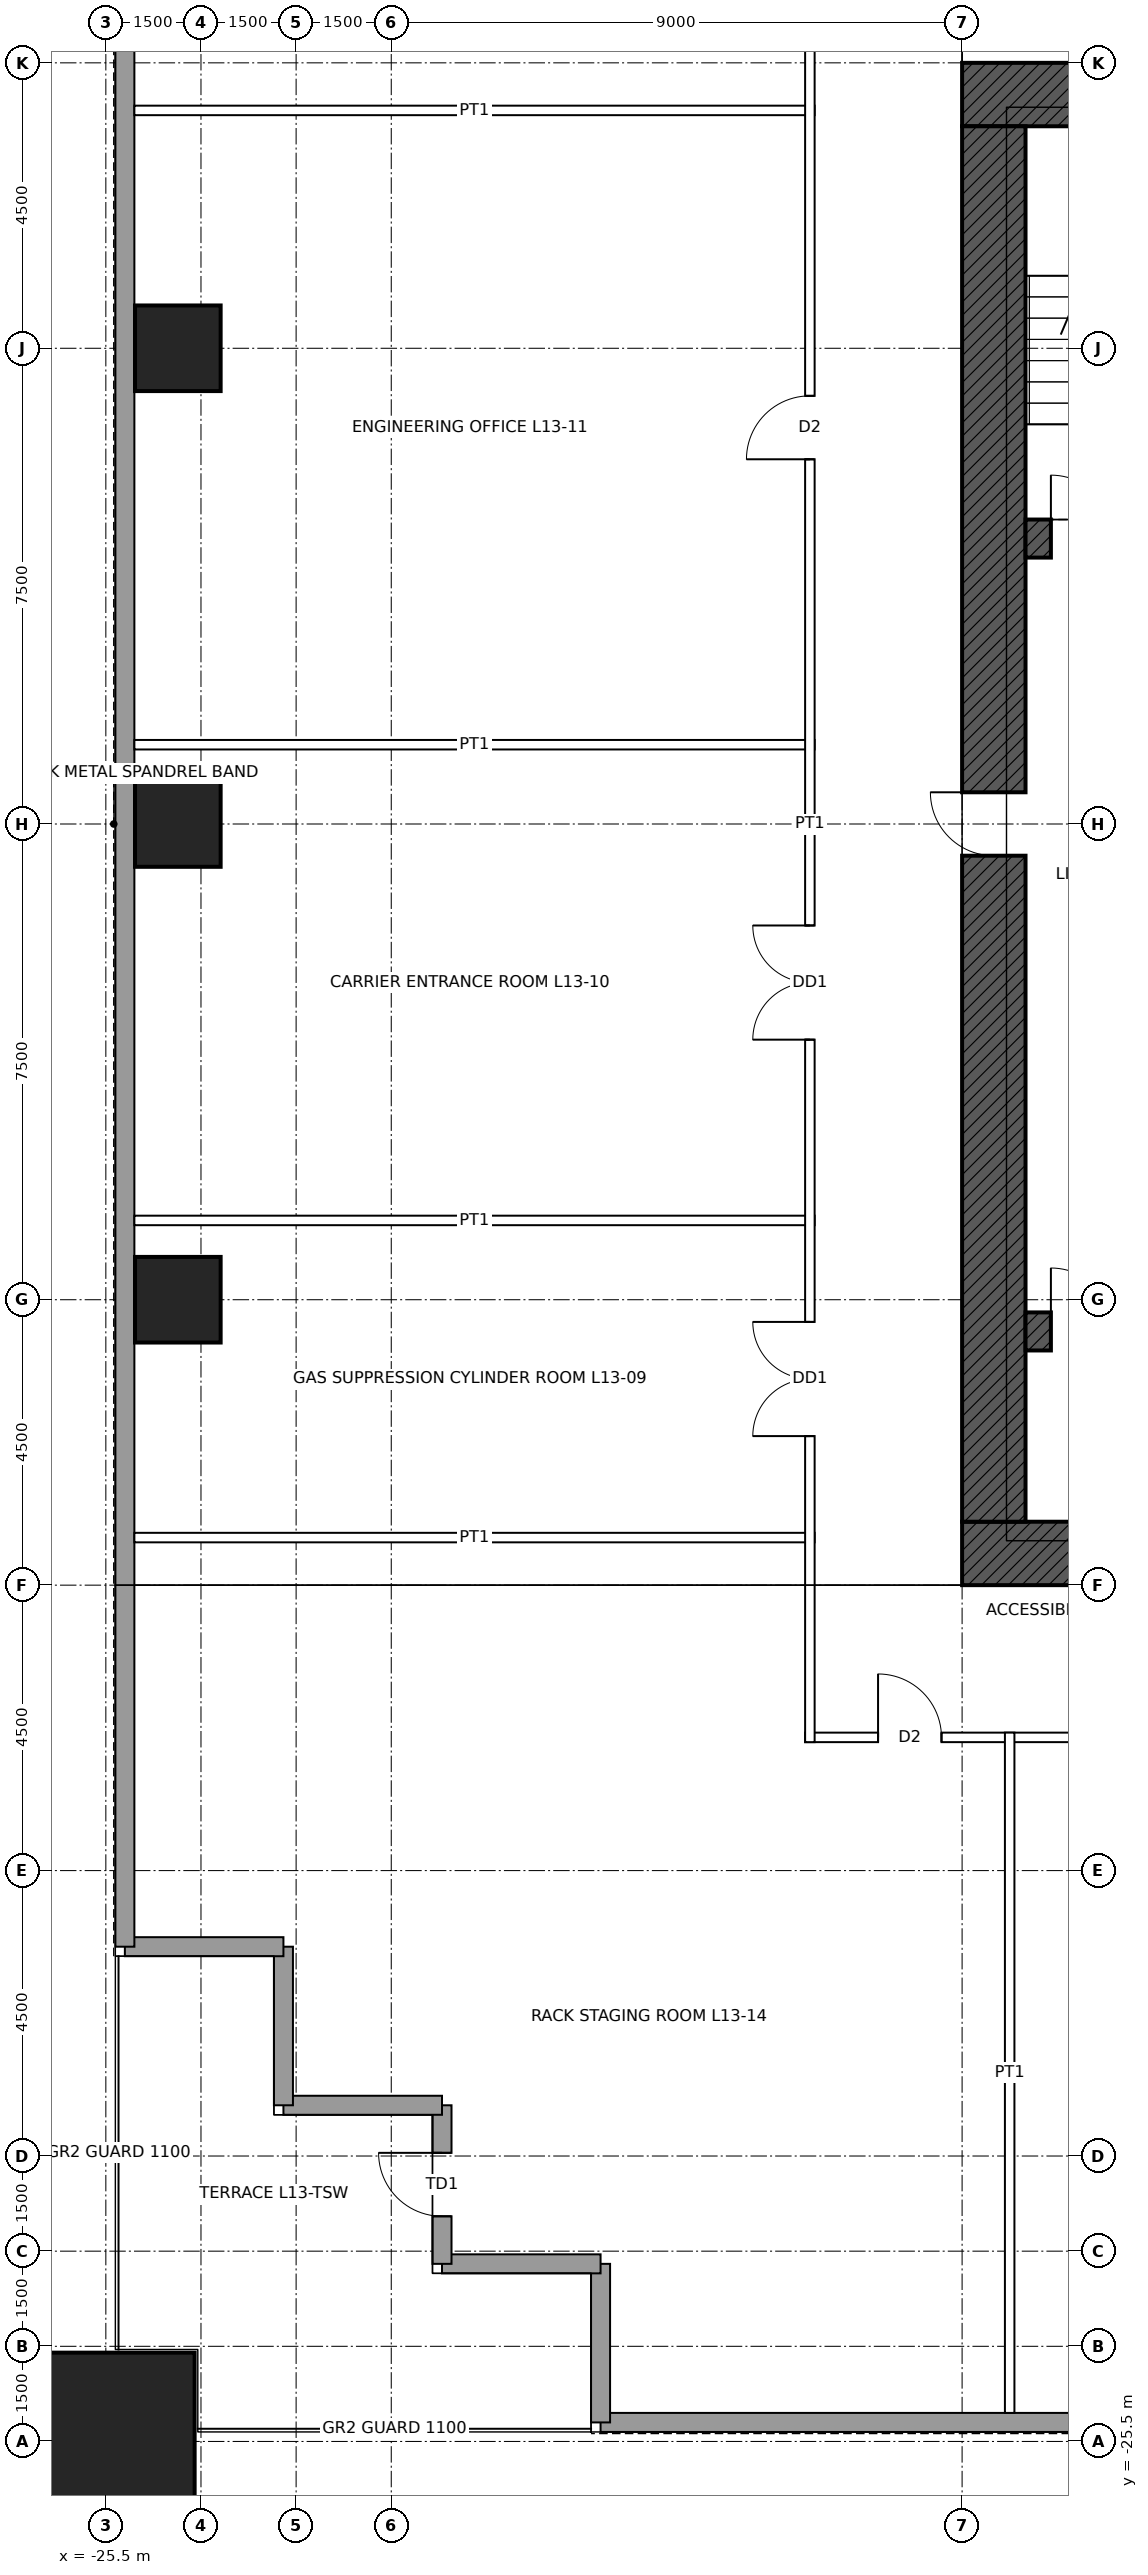
"""IFC4 building model, lengths in metres.
Left out: names, types, materials, properties, quantities, classifications, styles, units other than length and angle.
Written with IfcOpenShell. Run it as: python <this file> out.ifc"""

import sys

from ifc_helpers import new_model, si_unit, direction, frame, frame_2d, origin, origin_2d, place, context, subcontext, project, spatial, rectangle, hollow_rectangle, extrude, element, fill, save


model = new_model("IFC4")
c1 = context("Model", 3, precision=1e-05, world=origin(), true_north=direction((0.0, 1.0)))
c2 = subcontext(c1, "Body", "Model", "MODEL_VIEW")
j1 = project(units=[si_unit("LENGTHUNIT", "METRE"), si_unit("PLANEANGLEUNIT", "RADIAN")], contexts=[c1])
p1 = place(None, origin())
s1 = spatial("IfcSite", under=j1, at=p1, CompositionType="ELEMENT")
p2 = place(p1, origin())
s2 = spatial("IfcBuilding", under=s1, at=p2, CompositionType="ELEMENT")
p3 = place(p2, frame((0.0, 0.0, 68.4)))
s3 = spatial("IfcBuildingStorey", under=s2, at=p3, CompositionType="ELEMENT", Elevation=68.4)
p4 = place(p3, frame((-25.5, -25.5, 0.0), z_axis=(0.0, 0.0, 1.0), x_axis=(1.0, 0.0, 0.0)))
e1 = element("IfcColumn", 1, at=p4, inside=s3, PredefinedType="COLUMN", context=c2, shape_type="SweptSolid", body=[
    extrude(hollow_rectangle(XDim=2.8, YDim=2.8, WallThickness=0.14, at=origin_2d()), origin(), (0.0, 0.0, 1.0), 5.0),
])
for number, where, z_axis, x_axis in (
    (2, (-24.365, -7.5, 0.0), (0.0, 0.0, 1.0), (1.0, 0.0, 0.0)),
    (3, (-24.365, 0.0, 0.0), (0.0, 0.0, 1.0), (1.0, 0.0, 0.0)),
    (4, (-24.365, 7.5, 0.0), (0.0, 0.0, 1.0), (1.0, 0.0, 0.0)),
):
    element("IfcColumn", number, at=place(p3, frame(where, z_axis=z_axis, x_axis=x_axis)), inside=s3, PredefinedType="COLUMN", context=c2, shape_type="SweptSolid", body=[
        extrude(hollow_rectangle(XDim=1.35, YDim=1.35, WallThickness=0.085, at=origin_2d()), origin(), (0.0, 0.0, 1.0), 5.0),
    ])
p5 = place(p3, frame((-12.0, 11.5, 0.0), z_axis=(0.0, 0.0, 1.0), x_axis=(1.0, 0.0, 0.0)))
e5 = element("IfcWall", 5, at=p5, inside=s3, PredefinedType="SHEAR", context=c2, shape_type="SweptSolid", body=[
    extrude(rectangle(XDim=24.0, YDim=1.0, at=frame_2d((12.0, 0.0))), origin(), (0.0, 0.0, 1.0), 5.0),
])
p6 = place(p5, frame((6.25, 0.0, 0.0)))
e6 = element("IfcOpeningElement", 6, at=p6, cuts=e5, PredefinedType="OPENING", context=c2, shape_type="SweptSolid", body=[
    extrude(rectangle(XDim=1.0, YDim=2.4, at=frame_2d((0.5, 1.2))), frame((0.0, 0.51, 0.0), z_axis=(0.0, -1.0, 0.0), x_axis=(1.0, 0.0, 0.0)), (0.0, 0.0, 1.0), 1.02),
])
p7 = place(p5, frame((16.75, 0.0, 0.0)))
e7 = element("IfcOpeningElement", 7, at=p7, cuts=e5, PredefinedType="OPENING", context=c2, shape_type="SweptSolid", body=[
    extrude(rectangle(XDim=1.0, YDim=2.4, at=frame_2d((0.5, 1.2))), frame((0.0, 0.51, 0.0), z_axis=(0.0, -1.0, 0.0), x_axis=(1.0, 0.0, 0.0)), (0.0, 0.0, 1.0), 1.02),
])
p8 = place(p3, frame((12.0, -11.5, 0.0), z_axis=(0.0, 0.0, 1.0), x_axis=(-1.0, 0.0, 0.0)))
e8 = element("IfcWall", 8, at=p8, inside=s3, PredefinedType="SHEAR", context=c2, shape_type="SweptSolid", body=[
    extrude(rectangle(XDim=24.0, YDim=1.0, at=frame_2d((12.0, 0.0))), origin(), (0.0, 0.0, 1.0), 5.0),
])
p9 = place(p8, frame((11.5, 0.0, 0.0)))
e9 = element("IfcOpeningElement", 9, at=p9, cuts=e8, PredefinedType="OPENING", context=c2, shape_type="SweptSolid", body=[
    extrude(rectangle(XDim=1.0, YDim=2.1, at=frame_2d((0.5, 1.05))), frame((0.0, 0.51, 0.0), z_axis=(0.0, -1.0, 0.0), x_axis=(1.0, 0.0, 0.0)), (0.0, 0.0, 1.0), 1.02),
])
p10 = place(p8, frame((1.0, 0.0, 0.0)))
e10 = element("IfcOpeningElement", 10, at=p10, cuts=e8, PredefinedType="OPENING", context=c2, shape_type="SweptSolid", body=[
    extrude(rectangle(XDim=1.0, YDim=2.4, at=frame_2d((0.5, 1.2))), frame((0.0, 0.51, 0.0), z_axis=(0.0, -1.0, 0.0), x_axis=(1.0, 0.0, 0.0)), (0.0, 0.0, 1.0), 1.02),
])
p11 = place(p3, frame((-11.5, -11.0, 0.0), z_axis=(0.0, 0.0, 1.0), x_axis=(0.0, 1.0, 0.0)))
e11 = element("IfcWall", 11, at=p11, inside=s3, PredefinedType="SHEAR", context=c2, shape_type="SweptSolid", body=[
    extrude(rectangle(XDim=22.0, YDim=1.0, at=frame_2d((11.0, 0.0))), origin(), (0.0, 0.0, 1.0), 5.0),
])
p12 = place(p11, frame((10.5, 0.0, 0.0)))
e12 = element("IfcOpeningElement", 12, at=p12, cuts=e11, PredefinedType="OPENING", context=c2, shape_type="SweptSolid", body=[
    extrude(rectangle(XDim=1.0, YDim=2.4, at=frame_2d((0.5, 1.2))), frame((0.0, 0.51, 0.0), z_axis=(0.0, -1.0, 0.0), x_axis=(1.0, 0.0, 0.0)), (0.0, 0.0, 1.0), 1.02),
])
p13 = place(p3, frame((-11.0, 4.5, 0.0), z_axis=(0.0, 0.0, 1.0), x_axis=(1.0, 0.0, 0.0)))
e13 = element("IfcWall", 13, at=p13, inside=s3, PredefinedType="SHEAR", context=c2, shape_type="SweptSolid", body=[
    extrude(rectangle(XDim=22.0, YDim=0.6, at=frame_2d((11.0, 0.0))), origin(), (0.0, 0.0, 1.0), 5.0),
])
p14 = place(p13, frame((0.4, 0.0, 0.0)))
e14 = element("IfcOpeningElement", 14, at=p14, cuts=e13, PredefinedType="OPENING", context=c2, shape_type="SweptSolid", body=[
    extrude(rectangle(XDim=1.0, YDim=2.1, at=frame_2d((0.5, 1.05))), frame((0.0, 0.31, 0.0), z_axis=(0.0, -1.0, 0.0), x_axis=(1.0, 0.0, 0.0)), (0.0, 0.0, 1.0), 0.62),
])
p15 = place(p13, frame((20.6, 0.0, 0.0)))
e15 = element("IfcOpeningElement", 15, at=p15, cuts=e13, PredefinedType="OPENING", context=c2, shape_type="SweptSolid", body=[
    extrude(rectangle(XDim=1.0, YDim=2.1, at=frame_2d((0.5, 1.05))), frame((0.0, 0.31, 0.0), z_axis=(0.0, -1.0, 0.0), x_axis=(1.0, 0.0, 0.0)), (0.0, 0.0, 1.0), 0.62),
])
p16 = place(p3, frame((-11.0, -8.0, 0.0), z_axis=(0.0, 0.0, 1.0), x_axis=(1.0, 0.0, 0.0)))
e16 = element("IfcWall", 16, at=p16, inside=s3, PredefinedType="SHEAR", context=c2, shape_type="SweptSolid", body=[
    extrude(rectangle(XDim=2.0, YDim=0.6, at=frame_2d((1.0, 0.0))), origin(), (0.0, 0.0, 1.0), 5.0),
])
p17 = place(p16, frame((0.4, 0.0, 0.0)))
e17 = element("IfcOpeningElement", 17, at=p17, cuts=e16, PredefinedType="OPENING", context=c2, shape_type="SweptSolid", body=[
    extrude(rectangle(XDim=1.0, YDim=2.1, at=frame_2d((0.5, 1.05))), frame((0.0, 0.31, 0.0), z_axis=(0.0, -1.0, 0.0), x_axis=(1.0, 0.0, 0.0)), (0.0, 0.0, 1.0), 0.62),
])
p18 = place(p3, frame((17.7, -25.2, 0.0), z_axis=(0.0, 0.0, 1.0), x_axis=(-1.0, 0.0, 0.0)))
e18 = element("IfcWall", 18, at=p18, inside=s3, PredefinedType="SOLIDWALL", context=c2, shape_type="SweptSolid", body=[
    extrude(rectangle(XDim=35.4, YDim=0.3, at=frame_2d((17.7, 0.0))), origin(), (0.0, 0.0, 1.0), 4.8),
])
for number, where, z_axis, x_axis in (
    (19, (-17.7, -25.2, 0.0), (0.0, 0.0, 1.0), (0.0, 1.0, 0.0)),
    (20, (-17.7, -22.7, 0.0), (0.0, 0.0, 1.0), (-1.0, 0.0, 0.0)),
):
    element("IfcWall", number, at=place(p3, frame(where, z_axis=z_axis, x_axis=x_axis)), inside=s3, PredefinedType="SOLIDWALL", context=c2, shape_type="SweptSolid", body=[
        extrude(rectangle(XDim=2.5, YDim=0.3, at=frame_2d((1.25, 0.0))), origin(), (0.0, 0.0, 1.0), 4.8),
    ])
p19 = place(p3, frame((-20.2, -22.7, 0.0), z_axis=(0.0, 0.0, 1.0), x_axis=(0.0, 1.0, 0.0)))
e21 = element("IfcWall", 21, at=p19, inside=s3, PredefinedType="SOLIDWALL", context=c2, shape_type="SweptSolid", body=[
    extrude(rectangle(XDim=2.5, YDim=0.3, at=frame_2d((1.25, 0.0))), origin(), (0.0, 0.0, 1.0), 4.8),
])
p20 = place(p19, frame((0.75, 0.0, 0.0)))
e22 = element("IfcOpeningElement", 22, at=p20, cuts=e21, PredefinedType="OPENING", context=c2, shape_type="SweptSolid", body=[
    extrude(rectangle(XDim=1.0, YDim=2.4, at=frame_2d((0.5, 1.2))), frame((0.0, 0.16, 0.0), z_axis=(0.0, -1.0, 0.0), x_axis=(1.0, 0.0, 0.0)), (0.0, 0.0, 1.0), 0.32),
])
for number, where, z_axis, x_axis in (
    (23, (-20.2, -20.2, 0.0), (0.0, 0.0, 1.0), (-1.0, 0.0, 0.0)),
    (24, (-22.7, -20.2, 0.0), (0.0, 0.0, 1.0), (0.0, 1.0, 0.0)),
    (25, (-22.7, -17.7, 0.0), (0.0, 0.0, 1.0), (-1.0, 0.0, 0.0)),
):
    element("IfcWall", number, at=place(p3, frame(where, z_axis=z_axis, x_axis=x_axis)), inside=s3, PredefinedType="SOLIDWALL", context=c2, shape_type="SweptSolid", body=[
        extrude(rectangle(XDim=2.5, YDim=0.3, at=frame_2d((1.25, 0.0))), origin(), (0.0, 0.0, 1.0), 4.8),
    ])
p21 = place(p3, frame((-25.2, -17.7, 0.0), z_axis=(0.0, 0.0, 1.0), x_axis=(0.0, 1.0, 0.0)))
e26 = element("IfcWall", 26, at=p21, inside=s3, PredefinedType="SOLIDWALL", context=c2, shape_type="SweptSolid", body=[
    extrude(rectangle(XDim=35.4, YDim=0.3, at=frame_2d((17.7, 0.0))), origin(), (0.0, 0.0, 1.0), 4.8),
])
p22 = place(p3, frame((-14.475, -14.4, 0.0), z_axis=(0.0, 0.0, 1.0), x_axis=(1.0, 0.0, 0.0)))
e27 = element("IfcWall", 27, at=p22, inside=s3, PredefinedType="PARTITIONING", context=c2, shape_type="SweptSolid", body=[
    extrude(rectangle(XDim=28.95, YDim=0.15, at=frame_2d((14.475, 0.0))), origin(), (0.0, 0.0, 1.0), 4.8),
])
p23 = place(p22, frame((19.825, 0.0, 0.0)))
e28 = element("IfcOpeningElement", 28, at=p23, cuts=e27, PredefinedType="OPENING", context=c2, shape_type="SweptSolid", body=[
    extrude(rectangle(XDim=1.8, YDim=2.4, at=frame_2d((0.9, 1.2))), frame((0.0, 0.085, 0.0), z_axis=(0.0, -1.0, 0.0), x_axis=(1.0, 0.0, 0.0)), (0.0, 0.0, 1.0), 0.17),
])
p24 = place(p22, frame((8.975, 0.0, 0.0)))
e29 = element("IfcOpeningElement", 29, at=p24, cuts=e27, PredefinedType="OPENING", context=c2, shape_type="SweptSolid", body=[
    extrude(rectangle(XDim=1.0, YDim=2.1, at=frame_2d((0.5, 1.05))), frame((0.0, 0.085, 0.0), z_axis=(0.0, -1.0, 0.0), x_axis=(1.0, 0.0, 0.0)), (0.0, 0.0, 1.0), 0.17),
])
p25 = place(p22, frame((26.8, 0.0, 0.0)))
e30 = element("IfcOpeningElement", 30, at=p25, cuts=e27, PredefinedType="OPENING", context=c2, shape_type="SweptSolid", body=[
    extrude(rectangle(XDim=1.0, YDim=2.1, at=frame_2d((0.5, 1.05))), frame((0.0, 0.085, 0.0), z_axis=(0.0, -1.0, 0.0), x_axis=(1.0, 0.0, 0.0)), (0.0, 0.0, 1.0), 0.17),
])
p26 = place(p22, frame((1.15, 0.0, 0.0)))
e31 = element("IfcOpeningElement", 31, at=p26, cuts=e27, PredefinedType="OPENING", context=c2, shape_type="SweptSolid", body=[
    extrude(rectangle(XDim=1.0, YDim=2.1, at=frame_2d((0.5, 1.05))), frame((0.0, 0.085, 0.0), z_axis=(0.0, -1.0, 0.0), x_axis=(1.0, 0.0, 0.0)), (0.0, 0.0, 1.0), 0.17),
])
p27 = place(p3, frame((-25.05, -11.25, 0.0), z_axis=(0.0, 0.0, 1.0), x_axis=(1.0, 0.0, 0.0)))
e32 = element("IfcWall", 32, at=p27, inside=s3, PredefinedType="PARTITIONING", context=c2, shape_type="SweptSolid", body=[
    extrude(rectangle(XDim=10.725, YDim=0.15, at=frame_2d((5.363, 0.0))), origin(), (0.0, 0.0, 1.0), 3.853),
])
for number, where, z_axis, x_axis in (
    (33, (-25.05, -6.25, 0.0), (0.0, 0.0, 1.0), (1.0, 0.0, 0.0)),
    (34, (-25.05, 1.25, 0.0), (0.0, 0.0, 1.0), (1.0, 0.0, 0.0)),
):
    element("IfcWall", number, at=place(p3, frame(where, z_axis=z_axis, x_axis=x_axis)), inside=s3, PredefinedType="PARTITIONING", context=c2, shape_type="SweptSolid", body=[
        extrude(rectangle(XDim=10.725, YDim=0.15, at=frame_2d((5.363, 0.0))), origin(), (0.0, 0.0, 1.0), 4.8),
    ])
p28 = place(p3, frame((-25.05, 11.25, 0.0), z_axis=(0.0, 0.0, 1.0), x_axis=(1.0, 0.0, 0.0)))
e35 = element("IfcWall", 35, at=p28, inside=s3, PredefinedType="PARTITIONING", context=c2, shape_type="SweptSolid", body=[
    extrude(rectangle(XDim=10.725, YDim=0.15, at=frame_2d((5.363, 0.0))), origin(), (0.0, 0.0, 1.0), 3.853),
])
p29 = place(p3, frame((-14.4, -14.475, 0.0), z_axis=(0.0, 0.0, 1.0), x_axis=(0.0, 1.0, 0.0)))
e36 = element("IfcWall", 36, at=p29, inside=s3, PredefinedType="PARTITIONING", context=c2, shape_type="SweptSolid", body=[
    extrude(rectangle(XDim=28.95, YDim=0.15, at=frame_2d((14.475, 0.0))), origin(), (0.0, 0.0, 1.0), 4.8),
])
p30 = place(p29, frame((4.825, 0.0, 0.0)))
e37 = element("IfcOpeningElement", 37, at=p30, cuts=e36, PredefinedType="OPENING", context=c2, shape_type="SweptSolid", body=[
    extrude(rectangle(XDim=1.8, YDim=2.4, at=frame_2d((0.9, 1.2))), frame((0.0, 0.085, 0.0), z_axis=(0.0, -1.0, 0.0), x_axis=(1.0, 0.0, 0.0)), (0.0, 0.0, 1.0), 0.17),
])
p31 = place(p29, frame((11.075, 0.0, 0.0)))
e38 = element("IfcOpeningElement", 38, at=p31, cuts=e36, PredefinedType="OPENING", context=c2, shape_type="SweptSolid", body=[
    extrude(rectangle(XDim=1.8, YDim=2.4, at=frame_2d((0.9, 1.2))), frame((0.0, 0.085, 0.0), z_axis=(0.0, -1.0, 0.0), x_axis=(1.0, 0.0, 0.0)), (0.0, 0.0, 1.0), 0.17),
])
p32 = place(p29, frame((20.225, 0.0, 0.0)))
e39 = element("IfcOpeningElement", 39, at=p32, cuts=e36, PredefinedType="OPENING", context=c2, shape_type="SweptSolid", body=[
    extrude(rectangle(XDim=1.0, YDim=2.1, at=frame_2d((0.5, 1.05))), frame((0.0, 0.085, 0.0), z_axis=(0.0, -1.0, 0.0), x_axis=(1.0, 0.0, 0.0)), (0.0, 0.0, 1.0), 0.17),
])
p33 = place(p3, frame((-11.25, -25.05, 0.0), z_axis=(0.0, 0.0, 1.0), x_axis=(0.0, 1.0, 0.0)))
e40 = element("IfcWall", 40, at=p33, inside=s3, PredefinedType="PARTITIONING", context=c2, shape_type="SweptSolid", body=[
    extrude(rectangle(XDim=10.725, YDim=0.15, at=frame_2d((5.363, 0.0))), origin(), (0.0, 0.0, 1.0), 3.853),
])
p34 = place(p20, origin())
e41 = element("IfcDoor", 41, at=p34, inside=s3, OperationType="SINGLE_SWING_RIGHT", PredefinedType="DOOR", context=c2, shape_type="SweptSolid", body=[
    extrude(rectangle(XDim=1.0, YDim=2.4, at=frame_2d((0.5, 1.2))), frame((0.0, 0.025, 0.0), z_axis=(0.0, -1.0, 0.0), x_axis=(1.0, 0.0, 0.0)), (0.0, 0.0, 1.0), 0.05),
])
fill(e22, e41)
p35 = place(p14, origin())
e42 = element("IfcDoor", 42, at=p35, inside=s3, OperationType="SINGLE_SWING_LEFT", PredefinedType="DOOR", context=c2, shape_type="SweptSolid", body=[
    extrude(rectangle(XDim=1.0, YDim=2.1, at=frame_2d((0.5, 1.05))), frame((0.0, 0.025, 0.0), z_axis=(0.0, -1.0, 0.0), x_axis=(1.0, 0.0, 0.0)), (0.0, 0.0, 1.0), 0.05),
])
fill(e14, e42)
p36 = place(p12, origin())
e43 = element("IfcDoor", 43, at=p36, inside=s3, OperationType="SINGLE_SWING_RIGHT", PredefinedType="DOOR", context=c2, shape_type="SweptSolid", body=[
    extrude(rectangle(XDim=1.0, YDim=2.4, at=frame_2d((0.5, 1.2))), frame((0.0, 0.485, 0.0), z_axis=(0.0, -1.0, 0.0), x_axis=(1.0, 0.0, 0.0)), (0.0, 0.0, 1.0), 0.05),
])
fill(e12, e43)
p37 = place(p17, origin())
e44 = element("IfcDoor", 44, at=p37, inside=s3, OperationType="SINGLE_SWING_LEFT", PredefinedType="DOOR", context=c2, shape_type="SweptSolid", body=[
    extrude(rectangle(XDim=1.0, YDim=2.1, at=frame_2d((0.5, 1.05))), frame((0.0, 0.025, 0.0), z_axis=(0.0, -1.0, 0.0), x_axis=(1.0, 0.0, 0.0)), (0.0, 0.0, 1.0), 0.05),
])
fill(e17, e44)
p38 = place(p30, origin())
e45 = element("IfcDoor", 45, at=p38, inside=s3, OperationType="DOUBLE_DOOR_SINGLE_SWING", PredefinedType="DOOR", context=c2, shape_type="SweptSolid", body=[
    extrude(rectangle(XDim=1.8, YDim=2.4, at=frame_2d((0.9, 1.2))), frame((0.0, 0.025, 0.0), z_axis=(0.0, -1.0, 0.0), x_axis=(1.0, 0.0, 0.0)), (0.0, 0.0, 1.0), 0.05),
])
fill(e37, e45)
p39 = place(p31, origin())
e46 = element("IfcDoor", 46, at=p39, inside=s3, OperationType="DOUBLE_DOOR_SINGLE_SWING", PredefinedType="DOOR", context=c2, shape_type="SweptSolid", body=[
    extrude(rectangle(XDim=1.8, YDim=2.4, at=frame_2d((0.9, 1.2))), frame((0.0, 0.025, 0.0), z_axis=(0.0, -1.0, 0.0), x_axis=(1.0, 0.0, 0.0)), (0.0, 0.0, 1.0), 0.05),
])
fill(e38, e46)
p40 = place(p32, origin())
e47 = element("IfcDoor", 47, at=p40, inside=s3, OperationType="SINGLE_SWING_LEFT", PredefinedType="DOOR", context=c2, shape_type="SweptSolid", body=[
    extrude(rectangle(XDim=1.0, YDim=2.1, at=frame_2d((0.5, 1.05))), frame((0.0, 0.025, 0.0), z_axis=(0.0, -1.0, 0.0), x_axis=(1.0, 0.0, 0.0)), (0.0, 0.0, 1.0), 0.05),
])
fill(e39, e47)
p41 = place(p26, origin())
e48 = element("IfcDoor", 48, at=p41, inside=s3, OperationType="SINGLE_SWING_LEFT", PredefinedType="DOOR", context=c2, shape_type="SweptSolid", body=[
    extrude(rectangle(XDim=1.0, YDim=2.1, at=frame_2d((0.5, 1.05))), frame((0.0, 0.025, 0.0), z_axis=(0.0, -1.0, 0.0), x_axis=(1.0, 0.0, 0.0)), (0.0, 0.0, 1.0), 0.05),
])
fill(e31, e48)
save(model, sys.argv[1])
